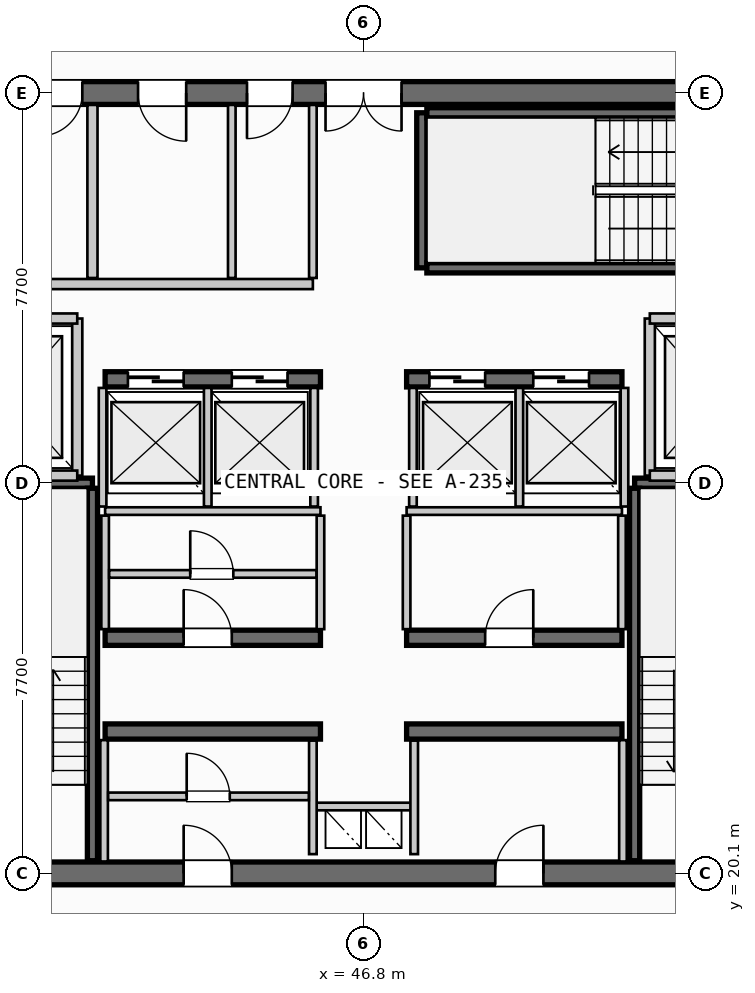
"""IFC4 building model, lengths in metres.
Left out: names, types, materials, properties, quantities, classifications, styles, units other than length and angle.
Written with IfcOpenShell. Run it as: python <this file> out.ifc"""

import sys

from ifc_helpers import new_model, si_unit, direction, frame, frame_2d, origin, place, context, subcontext, project, spatial, rectangle, extrude, source, transform, mapped, element, fill, save


model = new_model("IFC4")
c1 = context("Model", 3, precision=1e-05, world=origin(), true_north=direction((0.0, 1.0)))
c2 = subcontext(c1, "Body", "Model", "MODEL_VIEW")
j1 = project(units=[si_unit("LENGTHUNIT", "METRE"), si_unit("PLANEANGLEUNIT", "RADIAN")], contexts=[c1])
p1 = place(None, origin())
s1 = spatial("IfcSite", under=j1, at=p1, CompositionType="ELEMENT")
p2 = place(p1, origin())
s2 = spatial("IfcBuilding", under=s1, at=p2, CompositionType="ELEMENT")
p3 = place(p2, frame((0.0, 0.0, 256.0)))
s3 = spatial("IfcBuildingStorey", under=s2, at=p3, CompositionType="ELEMENT", Elevation=256.0)
p4 = place(p3, frame((38.0, 20.1, 0.0), z_axis=(0.0, 0.0, 1.0), x_axis=(1.0, 0.0, 0.0)))
e1 = element("IfcWall", 1, at=p4, inside=s3, PredefinedType="SHEAR", context=c2, shape_type="SweptSolid", body=[
    extrude(rectangle(XDim=17.6, YDim=0.45, at=frame_2d((8.8, 0.0))), origin(), (0.0, 0.0, 1.0), 3.21),
])
p5 = place(p4, frame((1.4, 0.0, 0.0)))
e2 = element("IfcOpeningElement", 2, at=p5, cuts=e1, PredefinedType="OPENING", context=c2, shape_type="SweptSolid", body=[
    extrude(rectangle(XDim=1.05, YDim=2.15, at=frame_2d((0.525, 1.075))), frame((0.0, 0.235, 0.0), z_axis=(0.0, -1.0, 0.0), x_axis=(1.0, 0.0, 0.0)), (0.0, 0.0, 1.0), 0.47),
])
p6 = place(p4, frame((15.15, 0.0, 0.0)))
e3 = element("IfcOpeningElement", 3, at=p6, cuts=e1, PredefinedType="OPENING", context=c2, shape_type="SweptSolid", body=[
    extrude(rectangle(XDim=1.05, YDim=2.15, at=frame_2d((0.525, 1.075))), frame((0.0, 0.235, 0.0), z_axis=(0.0, -1.0, 0.0), x_axis=(1.0, 0.0, 0.0)), (0.0, 0.0, 1.0), 0.47),
])
p7 = place(p4, frame((5.25, 0.0, 0.0)))
e4 = element("IfcOpeningElement", 4, at=p7, cuts=e1, PredefinedType="OPENING", context=c2, shape_type="SweptSolid", body=[
    extrude(rectangle(XDim=0.95, YDim=2.15, at=frame_2d((0.475, 1.075))), frame((0.0, 0.235, 0.0), z_axis=(0.0, -1.0, 0.0), x_axis=(1.0, 0.0, 0.0)), (0.0, 0.0, 1.0), 0.47),
])
p8 = place(p4, frame((11.4, 0.0, 0.0)))
e5 = element("IfcOpeningElement", 5, at=p8, cuts=e1, PredefinedType="OPENING", context=c2, shape_type="SweptSolid", body=[
    extrude(rectangle(XDim=0.95, YDim=2.15, at=frame_2d((0.475, 1.075))), frame((0.0, 0.235, 0.0), z_axis=(0.0, -1.0, 0.0), x_axis=(1.0, 0.0, 0.0)), (0.0, 0.0, 1.0), 0.47),
])
p9 = place(p3, frame((55.6, 35.5, 0.0), z_axis=(0.0, 0.0, 1.0), x_axis=(-1.0, 0.0, 0.0)))
e6 = element("IfcWall", 6, at=p9, inside=s3, PredefinedType="SHEAR", context=c2, shape_type="SweptSolid", body=[
    extrude(rectangle(XDim=17.6, YDim=0.45, at=frame_2d((8.8, 0.0))), origin(), (0.0, 0.0, 1.0), 3.21),
])
p10 = place(p9, frame((8.05, 0.0, 0.0)))
e7 = element("IfcOpeningElement", 7, at=p10, cuts=e6, PredefinedType="OPENING", context=c2, shape_type="SweptSolid", body=[
    extrude(rectangle(XDim=1.5, YDim=2.2, at=frame_2d((0.75, 1.1))), frame((0.0, 0.235, 0.0), z_axis=(0.0, -1.0, 0.0), x_axis=(1.0, 0.0, 0.0)), (0.0, 0.0, 1.0), 0.47),
])
p11 = place(p9, frame((15.85, 0.0, 0.0)))
e8 = element("IfcOpeningElement", 8, at=p11, cuts=e6, PredefinedType="OPENING", context=c2, shape_type="SweptSolid", body=[
    extrude(rectangle(XDim=0.85, YDim=2.15, at=frame_2d((0.425, 1.075))), frame((0.0, 0.235, 0.0), z_axis=(0.0, -1.0, 0.0), x_axis=(1.0, 0.0, 0.0)), (0.0, 0.0, 1.0), 0.47),
])
p12 = place(p9, frame((14.35, 0.0, 0.0)))
e9 = element("IfcOpeningElement", 9, at=p12, cuts=e6, PredefinedType="OPENING", context=c2, shape_type="SweptSolid", body=[
    extrude(rectangle(XDim=0.85, YDim=2.15, at=frame_2d((0.425, 1.075))), frame((0.0, 0.235, 0.0), z_axis=(0.0, -1.0, 0.0), x_axis=(1.0, 0.0, 0.0)), (0.0, 0.0, 1.0), 0.47),
])
p13 = place(p9, frame((12.3, 0.0, 0.0)))
e10 = element("IfcOpeningElement", 10, at=p13, cuts=e6, PredefinedType="OPENING", context=c2, shape_type="SweptSolid", body=[
    extrude(rectangle(XDim=0.95, YDim=2.15, at=frame_2d((0.475, 1.075))), frame((0.0, 0.235, 0.0), z_axis=(0.0, -1.0, 0.0), x_axis=(1.0, 0.0, 0.0)), (0.0, 0.0, 1.0), 0.47),
])
p14 = place(p9, frame((10.2, 0.0, 0.0)))
e11 = element("IfcOpeningElement", 11, at=p14, cuts=e6, PredefinedType="OPENING", context=c2, shape_type="SweptSolid", body=[
    extrude(rectangle(XDim=0.9, YDim=2.15, at=frame_2d((0.45, 1.075))), frame((0.0, 0.235, 0.0), z_axis=(0.0, -1.0, 0.0), x_axis=(1.0, 0.0, 0.0)), (0.0, 0.0, 1.0), 0.47),
])
for number, where, z_axis, x_axis in (
    (12, (41.7, 22.9, 0.0), (0.0, 0.0, 1.0), (1.0, 0.0, 0.0)),
    (13, (47.65, 22.9, 0.0), (0.0, 0.0, 1.0), (1.0, 0.0, 0.0)),
):
    element("IfcWall", number, at=place(p3, frame(where, z_axis=z_axis, x_axis=x_axis)), inside=s3, PredefinedType="SHEAR", context=c2, shape_type="SweptSolid", body=[
        extrude(rectangle(XDim=4.25, YDim=0.3, at=frame_2d((2.125, 0.0))), origin(), (0.0, 0.0, 1.0), 3.21),
    ])
p15 = place(p3, frame((41.7, 24.75, 0.0), z_axis=(0.0, 0.0, 1.0), x_axis=(1.0, 0.0, 0.0)))
e14 = element("IfcWall", 14, at=p15, inside=s3, PredefinedType="SHEAR", context=c2, shape_type="SweptSolid", body=[
    extrude(rectangle(XDim=4.25, YDim=0.3, at=frame_2d((2.125, 0.0))), origin(), (0.0, 0.0, 1.0), 3.21),
])
p16 = place(p15, frame((1.55, 0.0, 0.0)))
e15 = element("IfcOpeningElement", 15, at=p16, cuts=e14, PredefinedType="OPENING", context=c2, shape_type="SweptSolid", body=[
    extrude(rectangle(XDim=0.95, YDim=2.15, at=frame_2d((0.475, 1.075))), frame((0.0, 0.16, 0.0), z_axis=(0.0, -1.0, 0.0), x_axis=(1.0, 0.0, 0.0)), (0.0, 0.0, 1.0), 0.32),
])
p17 = place(p3, frame((47.65, 24.75, 0.0), z_axis=(0.0, 0.0, 1.0), x_axis=(1.0, 0.0, 0.0)))
e16 = element("IfcWall", 16, at=p17, inside=s3, PredefinedType="SHEAR", context=c2, shape_type="SweptSolid", body=[
    extrude(rectangle(XDim=4.25, YDim=0.3, at=frame_2d((2.125, 0.0))), origin(), (0.0, 0.0, 1.0), 3.21),
])
p18 = place(p17, frame((1.55, 0.0, 0.0)))
e17 = element("IfcOpeningElement", 17, at=p18, cuts=e16, PredefinedType="OPENING", context=c2, shape_type="SweptSolid", body=[
    extrude(rectangle(XDim=0.95, YDim=2.15, at=frame_2d((0.475, 1.075))), frame((0.0, 0.16, 0.0), z_axis=(0.0, -1.0, 0.0), x_axis=(1.0, 0.0, 0.0)), (0.0, 0.0, 1.0), 0.32),
])
p19 = place(p3, frame((41.7, 29.85, 0.0), z_axis=(0.0, 0.0, 1.0), x_axis=(1.0, 0.0, 0.0)))
e18 = element("IfcWall", 18, at=p19, inside=s3, PredefinedType="SHEAR", context=c2, shape_type="SweptSolid", body=[
    extrude(rectangle(XDim=4.25, YDim=0.3, at=frame_2d((2.125, 0.0))), origin(), (0.0, 0.0, 1.0), 3.21),
])
p20 = place(p19, frame((0.45, 0.0, 0.0)))
e19 = element("IfcOpeningElement", 19, at=p20, cuts=e18, PredefinedType="OPENING", context=c2, shape_type="SweptSolid", body=[
    extrude(rectangle(XDim=1.1, YDim=2.2, at=frame_2d((0.55, 1.1))), frame((0.0, 0.16, 0.0), z_axis=(0.0, -1.0, 0.0), x_axis=(1.0, 0.0, 0.0)), (0.0, 0.0, 1.0), 0.32),
])
p21 = place(p19, frame((2.5, 0.0, 0.0)))
e20 = element("IfcOpeningElement", 20, at=p21, cuts=e18, PredefinedType="OPENING", context=c2, shape_type="SweptSolid", body=[
    extrude(rectangle(XDim=1.1, YDim=2.2, at=frame_2d((0.55, 1.1))), frame((0.0, 0.16, 0.0), z_axis=(0.0, -1.0, 0.0), x_axis=(1.0, 0.0, 0.0)), (0.0, 0.0, 1.0), 0.32),
])
p22 = place(p3, frame((47.65, 29.85, 0.0), z_axis=(0.0, 0.0, 1.0), x_axis=(1.0, 0.0, 0.0)))
e21 = element("IfcWall", 21, at=p22, inside=s3, PredefinedType="SHEAR", context=c2, shape_type="SweptSolid", body=[
    extrude(rectangle(XDim=4.25, YDim=0.3, at=frame_2d((2.125, 0.0))), origin(), (0.0, 0.0, 1.0), 3.21),
])
p23 = place(p22, frame((0.45, 0.0, 0.0)))
e22 = element("IfcOpeningElement", 22, at=p23, cuts=e21, PredefinedType="OPENING", context=c2, shape_type="SweptSolid", body=[
    extrude(rectangle(XDim=1.1, YDim=2.2, at=frame_2d((0.55, 1.1))), frame((0.0, 0.16, 0.0), z_axis=(0.0, -1.0, 0.0), x_axis=(1.0, 0.0, 0.0)), (0.0, 0.0, 1.0), 0.32),
])
p24 = place(p22, frame((2.5, 0.0, 0.0)))
e23 = element("IfcOpeningElement", 23, at=p24, cuts=e21, PredefinedType="OPENING", context=c2, shape_type="SweptSolid", body=[
    extrude(rectangle(XDim=1.1, YDim=2.2, at=frame_2d((0.55, 1.1))), frame((0.0, 0.16, 0.0), z_axis=(0.0, -1.0, 0.0), x_axis=(1.0, 0.0, 0.0)), (0.0, 0.0, 1.0), 0.32),
])
p25 = place(p3, frame((38.39, 27.8, 0.0), z_axis=(0.0, 0.0, 1.0), x_axis=(1.0, 0.0, 0.0)))
e24 = element("IfcWall", 24, at=p25, inside=s3, PredefinedType="SHEAR", context=c2, shape_type="SweptSolid", body=[
    extrude(rectangle(XDim=3.06, YDim=0.2, at=frame_2d((1.53, 0.0))), origin(), (0.0, 0.0, 1.0), 3.21),
])
p26 = place(p3, frame((41.45, 27.7, 0.0), z_axis=(0.0, 0.0, 1.0), x_axis=(0.0, -1.0, 0.0)))
e25 = element("IfcWall", 25, at=p26, inside=s3, PredefinedType="SHEAR", context=c2, shape_type="SweptSolid", body=[
    extrude(rectangle(XDim=7.35, YDim=0.2, at=frame_2d((3.675, 0.0))), origin(), (0.0, 0.0, 1.0), 3.21),
])
p27 = place(p3, frame((52.15, 27.8, 0.0), z_axis=(0.0, 0.0, 1.0), x_axis=(1.0, 0.0, 0.0)))
e26 = element("IfcWall", 26, at=p27, inside=s3, PredefinedType="SHEAR", context=c2, shape_type="SweptSolid", body=[
    extrude(rectangle(XDim=3.06, YDim=0.2, at=frame_2d((1.53, 0.0))), origin(), (0.0, 0.0, 1.0), 3.21),
])
p28 = place(p3, frame((52.15, 20.35, 0.0), z_axis=(0.0, 0.0, 1.0), x_axis=(0.0, 1.0, 0.0)))
e27 = element("IfcWall", 27, at=p28, inside=s3, PredefinedType="SHEAR", context=c2, shape_type="SweptSolid", body=[
    extrude(rectangle(XDim=7.35, YDim=0.2, at=frame_2d((3.675, 0.0))), origin(), (0.0, 0.0, 1.0), 3.21),
])
p29 = place(p3, frame((47.95, 32.05, 0.0), z_axis=(0.0, 0.0, 1.0), x_axis=(0.0, 1.0, 0.0)))
e28 = element("IfcWall", 28, at=p29, inside=s3, PredefinedType="SHEAR", context=c2, shape_type="SweptSolid", body=[
    extrude(rectangle(XDim=3.06, YDim=0.2, at=frame_2d((1.53, 0.0))), origin(), (0.0, 0.0, 1.0), 3.21),
])
for number, where, z_axis, x_axis in (
    (29, (48.05, 35.11, 0.0), (0.0, 0.0, 1.0), (1.0, 0.0, 0.0)),
    (30, (55.4, 32.05, 0.0), (0.0, 0.0, 1.0), (-1.0, 0.0, 0.0)),
):
    element("IfcWall", number, at=place(p3, frame(where, z_axis=z_axis, x_axis=x_axis)), inside=s3, PredefinedType="SHEAR", context=c2, shape_type="SweptSolid", body=[
        extrude(rectangle(XDim=7.35, YDim=0.2, at=frame_2d((3.675, 0.0))), origin(), (0.0, 0.0, 1.0), 3.21),
    ])
p30 = place(p3, frame((45.8, 21.42, 0.0), z_axis=(0.0, 0.0, 1.0), x_axis=(1.0, 0.0, 0.0)))
e31 = element("IfcWall", 31, at=p30, inside=s3, PredefinedType="PARTITIONING", context=c2, shape_type="SweptSolid", body=[
    extrude(rectangle(XDim=2.0, YDim=0.15, at=frame_2d((1.0, 0.0))), origin(), (0.0, 0.0, 1.0), 2.28),
])
for number, where, z_axis, x_axis in (
    (32, (45.8, 20.48, 0.0), (0.0, 0.0, 1.0), (0.0, 1.0, 0.0)),
    (33, (47.8, 20.48, 0.0), (0.0, 0.0, 1.0), (0.0, 1.0, 0.0)),
):
    element("IfcWall", number, at=place(p3, frame(where, z_axis=z_axis, x_axis=x_axis)), inside=s3, PredefinedType="PARTITIONING", context=c2, shape_type="SweptSolid", body=[
        extrude(rectangle(XDim=2.24, YDim=0.15, at=frame_2d((1.12, 0.0))), origin(), (0.0, 0.0, 1.0), 2.28),
    ])
p31 = place(p3, frame((41.15, 27.95, 0.0), z_axis=(0.0, 0.0, 1.0), x_axis=(0.0, 1.0, 0.0)))
e34 = element("IfcWall", 34, at=p31, inside=s3, PredefinedType="PARTITIONING", context=c2, shape_type="SweptSolid", body=[
    extrude(rectangle(XDim=3.1, YDim=0.2, at=frame_2d((1.55, 0.0))), origin(), (0.0, 0.0, 1.0), 2.28),
])
for number, where, z_axis, x_axis in (
    (35, (38.235, 27.95, 0.0), (0.0, 0.0, 1.0), (1.0, 0.0, 0.0)),
    (36, (38.235, 31.05, 0.0), (0.0, 0.0, 1.0), (1.0, 0.0, 0.0)),
):
    element("IfcWall", number, at=place(p3, frame(where, z_axis=z_axis, x_axis=x_axis)), inside=s3, PredefinedType="PARTITIONING", context=c2, shape_type="SweptSolid", body=[
        extrude(rectangle(XDim=2.915, YDim=0.2, at=frame_2d((1.458, 0.0))), origin(), (0.0, 0.0, 1.0), 2.28),
    ])
p32 = place(p3, frame((52.45, 27.95, 0.0), z_axis=(0.0, 0.0, 1.0), x_axis=(0.0, 1.0, 0.0)))
e37 = element("IfcWall", 37, at=p32, inside=s3, PredefinedType="PARTITIONING", context=c2, shape_type="SweptSolid", body=[
    extrude(rectangle(XDim=3.1, YDim=0.2, at=frame_2d((1.55, 0.0))), origin(), (0.0, 0.0, 1.0), 2.28),
])
for number, where, z_axis, x_axis in (
    (38, (52.45, 27.95, 0.0), (0.0, 0.0, 1.0), (1.0, 0.0, 0.0)),
    (39, (52.45, 31.05, 0.0), (0.0, 0.0, 1.0), (1.0, 0.0, 0.0)),
):
    element("IfcWall", number, at=place(p3, frame(where, z_axis=z_axis, x_axis=x_axis)), inside=s3, PredefinedType="PARTITIONING", context=c2, shape_type="SweptSolid", body=[
        extrude(rectangle(XDim=2.915, YDim=0.2, at=frame_2d((1.458, 0.0))), origin(), (0.0, 0.0, 1.0), 2.28),
    ])
for number, where, z_axis, x_axis in (
    (40, (41.68, 20.335, 0.0), (0.0, 0.0, 1.0), (0.0, 1.0, 0.0)),
    (41, (51.92, 20.335, 0.0), (0.0, 0.0, 1.0), (0.0, 1.0, 0.0)),
):
    element("IfcWall", number, at=place(p3, frame(where, z_axis=z_axis, x_axis=x_axis)), inside=s3, PredefinedType="PARTITIONING", context=c2, shape_type="SweptSolid", body=[
        extrude(rectangle(XDim=2.395, YDim=0.15, at=frame_2d((1.198, 0.0))), origin(), (0.0, 0.0, 1.0), 2.28),
    ])
p33 = place(p3, frame((41.76, 21.62, 0.0), z_axis=(0.0, 0.0, 1.0), x_axis=(1.0, 0.0, 0.0)))
e42 = element("IfcWall", 42, at=p33, inside=s3, PredefinedType="PARTITIONING", context=c2, shape_type="SweptSolid", body=[
    extrude(rectangle(XDim=3.96, YDim=0.15, at=frame_2d((1.98, 0.0))), origin(), (0.0, 0.0, 1.0), 2.28),
])
p34 = place(p33, frame((1.55, 0.0, 0.0)))
e43 = element("IfcOpeningElement", 43, at=p34, cuts=e42, PredefinedType="OPENING", context=c2, shape_type="SweptSolid", body=[
    extrude(rectangle(XDim=0.85, YDim=2.15, at=frame_2d((0.425, 1.075))), frame((0.0, 0.085, 0.0), z_axis=(0.0, -1.0, 0.0), x_axis=(1.0, 0.0, 0.0)), (0.0, 0.0, 1.0), 0.17),
])
for number, where, z_axis, x_axis in (
    (44, (41.7, 27.25, 0.0), (0.0, 0.0, 1.0), (1.0, 0.0, 0.0)),
    (45, (47.65, 27.25, 0.0), (0.0, 0.0, 1.0), (1.0, 0.0, 0.0)),
):
    element("IfcWall", number, at=place(p3, frame(where, z_axis=z_axis, x_axis=x_axis)), inside=s3, PredefinedType="PARTITIONING", context=c2, shape_type="SweptSolid", body=[
        extrude(rectangle(XDim=4.25, YDim=0.15, at=frame_2d((2.125, 0.0))), origin(), (0.0, 0.0, 1.0), 2.28),
    ])
for number, where, z_axis, x_axis in (
    (46, (41.7, 24.92, 0.0), (0.0, 0.0, 1.0), (0.0, 1.0, 0.0)),
    (47, (45.95, 24.92, 0.0), (0.0, 0.0, 1.0), (0.0, 1.0, 0.0)),
    (48, (47.65, 24.92, 0.0), (0.0, 0.0, 1.0), (0.0, 1.0, 0.0)),
    (49, (51.9, 24.92, 0.0), (0.0, 0.0, 1.0), (0.0, 1.0, 0.0)),
):
    element("IfcWall", number, at=place(p3, frame(where, z_axis=z_axis, x_axis=x_axis)), inside=s3, PredefinedType="PARTITIONING", context=c2, shape_type="SweptSolid", body=[
        extrude(rectangle(XDim=2.24, YDim=0.15, at=frame_2d((1.12, 0.0))), origin(), (0.0, 0.0, 1.0), 2.28),
    ])
p35 = place(p3, frame((41.78, 26.01, 0.0), z_axis=(0.0, 0.0, 1.0), x_axis=(1.0, 0.0, 0.0)))
e50 = element("IfcWall", 50, at=p35, inside=s3, PredefinedType="PARTITIONING", context=c2, shape_type="SweptSolid", body=[
    extrude(rectangle(XDim=4.09, YDim=0.15, at=frame_2d((2.045, 0.0))), origin(), (0.0, 0.0, 1.0), 2.28),
])
p36 = place(p35, frame((1.6, 0.0, 0.0)))
e51 = element("IfcOpeningElement", 51, at=p36, cuts=e50, PredefinedType="OPENING", context=c2, shape_type="SweptSolid", body=[
    extrude(rectangle(XDim=0.85, YDim=2.15, at=frame_2d((0.425, 1.075))), frame((0.0, 0.085, 0.0), z_axis=(0.0, -1.0, 0.0), x_axis=(1.0, 0.0, 0.0)), (0.0, 0.0, 1.0), 0.17),
])
for number, where, z_axis, x_axis in (
    (52, (41.65, 27.34, 0.0), (0.0, 0.0, 1.0), (0.0, 1.0, 0.0)),
    (53, (43.725, 27.34, 0.0), (0.0, 0.0, 1.0), (0.0, 1.0, 0.0)),
    (54, (45.825, 27.34, 0.0), (0.0, 0.0, 1.0), (0.0, 1.0, 0.0)),
    (55, (47.775, 27.34, 0.0), (0.0, 0.0, 1.0), (0.0, 1.0, 0.0)),
    (56, (49.875, 27.34, 0.0), (0.0, 0.0, 1.0), (0.0, 1.0, 0.0)),
    (57, (51.95, 27.34, 0.0), (0.0, 0.0, 1.0), (0.0, 1.0, 0.0)),
):
    element("IfcWall", number, at=place(p3, frame(where, z_axis=z_axis, x_axis=x_axis)), inside=s3, PredefinedType="PARTITIONING", context=c2, shape_type="SweptSolid", body=[
        extrude(rectangle(XDim=2.34, YDim=0.15, at=frame_2d((1.17, 0.0))), origin(), (0.0, 0.0, 1.0), 2.28),
    ])
p37 = place(p3, frame((41.45, 31.85, 0.0), z_axis=(0.0, 0.0, 1.0), x_axis=(0.0, 1.0, 0.0)))
e58 = element("IfcWall", 58, at=p37, inside=s3, PredefinedType="PARTITIONING", context=c2, shape_type="SweptSolid", body=[
    extrude(rectangle(XDim=3.415, YDim=0.2, at=frame_2d((1.708, 0.0))), origin(), (0.0, 0.0, 1.0), 2.28),
])
p38 = place(p3, frame((38.235, 31.73, 0.0), z_axis=(0.0, 0.0, 1.0), x_axis=(1.0, 0.0, 0.0)))
e59 = element("IfcWall", 59, at=p38, inside=s3, PredefinedType="PARTITIONING", context=c2, shape_type="SweptSolid", body=[
    extrude(rectangle(XDim=7.565, YDim=0.2, at=frame_2d((3.782, 0.0))), origin(), (0.0, 0.0, 1.0), 2.28),
])
p39 = place(p3, frame((45.8, 31.85, 0.0), z_axis=(0.0, 0.0, 1.0), x_axis=(0.0, 1.0, 0.0)))
e60 = element("IfcWall", 60, at=p39, inside=s3, PredefinedType="PARTITIONING", context=c2, shape_type="SweptSolid", body=[
    extrude(rectangle(XDim=3.415, YDim=0.15, at=frame_2d((1.708, 0.0))), origin(), (0.0, 0.0, 1.0), 2.28),
])
p40 = place(p3, frame((44.2, 31.85, 0.0), z_axis=(0.0, 0.0, 1.0), x_axis=(0.0, 1.0, 0.0)))
e61 = element("IfcWall", 61, at=p40, inside=s3, PredefinedType="PLUMBINGWALL", context=c2, shape_type="SweptSolid", body=[
    extrude(rectangle(XDim=3.415, YDim=0.15, at=frame_2d((1.708, 0.0))), origin(), (0.0, 0.0, 1.0), 2.28),
])
m1 = source(origin(), c2, "Body", "SweptSolid", [
    extrude(rectangle(XDim=1.5, YDim=2.2, at=frame_2d((0.75, 1.1))), frame((0.0, 0.025, 0.0), z_axis=(0.0, -1.0, 0.0), x_axis=(1.0, 0.0, 0.0)), (0.0, 0.0, 1.0), 0.05),
])
p41 = place(p10, origin())
e62 = element("IfcDoor", 62, at=p41, inside=s3, OperationType="DOUBLE_DOOR_SINGLE_SWING", PredefinedType="DOOR", context=c2, shape_type="MappedRepresentation", body=[
    mapped(m1, transform((0.0, 0.0, 0.0), scale=1.0)),
])
fill(e7, e62)
m2 = source(origin(), c2, "Body", "SweptSolid", [
    extrude(rectangle(XDim=0.95, YDim=2.15, at=frame_2d((0.475, 1.075))), frame((0.0, 0.025, 0.0), z_axis=(0.0, -1.0, 0.0), x_axis=(1.0, 0.0, 0.0)), (0.0, 0.0, 1.0), 0.05),
])
p42 = place(p7, origin())
e63 = element("IfcDoor", 63, at=p42, inside=s3, OperationType="SINGLE_SWING_LEFT", PredefinedType="DOOR", context=c2, shape_type="MappedRepresentation", body=[
    mapped(m2, transform((0.0, 0.0, 0.0), scale=1.0)),
])
fill(e4, e63)
p43 = place(p8, origin())
e64 = element("IfcDoor", 64, at=p43, inside=s3, OperationType="SINGLE_SWING_RIGHT", PredefinedType="DOOR", context=c2, shape_type="MappedRepresentation", body=[
    mapped(m2, transform((0.0, 0.0, 0.0), scale=1.0)),
])
fill(e5, e64)
p44 = place(p16, origin())
e65 = element("IfcDoor", 65, at=p44, inside=s3, OperationType="SINGLE_SWING_LEFT", PredefinedType="DOOR", context=c2, shape_type="MappedRepresentation", body=[
    mapped(m2, transform((0.0, 0.0, 0.0), scale=1.0)),
])
fill(e15, e65)
p45 = place(p18, origin())
e66 = element("IfcDoor", 66, at=p45, inside=s3, OperationType="SINGLE_SWING_RIGHT", PredefinedType="DOOR", context=c2, shape_type="MappedRepresentation", body=[
    mapped(m2, transform((0.0, 0.0, 0.0), scale=1.0)),
])
fill(e17, e66)
m3 = source(origin(), c2, "Body", "SweptSolid", [
    extrude(rectangle(XDim=1.1, YDim=2.2, at=frame_2d((0.55, 1.1))), frame((0.0, 0.025, 0.0), z_axis=(0.0, -1.0, 0.0), x_axis=(1.0, 0.0, 0.0)), (0.0, 0.0, 1.0), 0.05),
])
p46 = place(p20, origin())
e67 = element("IfcDoor", 67, at=p46, inside=s3, OperationType="SLIDING_TO_LEFT", PredefinedType="DOOR", context=c2, shape_type="MappedRepresentation", body=[
    mapped(m3, transform((0.0, 0.0, 0.0), scale=1.0)),
])
fill(e19, e67)
p47 = place(p21, origin())
e68 = element("IfcDoor", 68, at=p47, inside=s3, OperationType="SLIDING_TO_LEFT", PredefinedType="DOOR", context=c2, shape_type="MappedRepresentation", body=[
    mapped(m3, transform((0.0, 0.0, 0.0), scale=1.0)),
])
fill(e20, e68)
p48 = place(p23, origin())
e69 = element("IfcDoor", 69, at=p48, inside=s3, OperationType="SLIDING_TO_LEFT", PredefinedType="DOOR", context=c2, shape_type="MappedRepresentation", body=[
    mapped(m3, transform((0.0, 0.0, 0.0), scale=1.0)),
])
fill(e22, e69)
p49 = place(p24, origin())
e70 = element("IfcDoor", 70, at=p49, inside=s3, OperationType="SLIDING_TO_LEFT", PredefinedType="DOOR", context=c2, shape_type="MappedRepresentation", body=[
    mapped(m3, transform((0.0, 0.0, 0.0), scale=1.0)),
])
fill(e23, e70)
m4 = source(origin(), c2, "Body", "SweptSolid", [
    extrude(rectangle(XDim=0.85, YDim=2.15, at=frame_2d((0.425, 1.075))), frame((0.0, 0.025, 0.0), z_axis=(0.0, -1.0, 0.0), x_axis=(1.0, 0.0, 0.0)), (0.0, 0.0, 1.0), 0.05),
])
p50 = place(p12, origin())
e71 = element("IfcDoor", 71, at=p50, inside=s3, OperationType="SINGLE_SWING_RIGHT", PredefinedType="DOOR", context=c2, shape_type="MappedRepresentation", body=[
    mapped(m4, transform((0.0, 0.0, 0.0), scale=1.0)),
])
fill(e9, e71)
p51 = place(p13, origin())
e72 = element("IfcDoor", 72, at=p51, inside=s3, OperationType="SINGLE_SWING_LEFT", PredefinedType="DOOR", context=c2, shape_type="MappedRepresentation", body=[
    mapped(m2, transform((0.0, 0.0, 0.0), scale=1.0)),
])
fill(e10, e72)
m5 = source(origin(), c2, "Body", "SweptSolid", [
    extrude(rectangle(XDim=0.9, YDim=2.15, at=frame_2d((0.45, 1.075))), frame((0.0, 0.025, 0.0), z_axis=(0.0, -1.0, 0.0), x_axis=(1.0, 0.0, 0.0)), (0.0, 0.0, 1.0), 0.05),
])
p52 = place(p14, origin())
e73 = element("IfcDoor", 73, at=p52, inside=s3, OperationType="SINGLE_SWING_RIGHT", PredefinedType="DOOR", context=c2, shape_type="MappedRepresentation", body=[
    mapped(m5, transform((0.0, 0.0, 0.0), scale=1.0)),
])
fill(e11, e73)
p53 = place(p34, origin())
e74 = element("IfcDoor", 74, at=p53, inside=s3, OperationType="SINGLE_SWING_LEFT", PredefinedType="DOOR", context=c2, shape_type="MappedRepresentation", body=[
    mapped(m4, transform((0.0, 0.0, 0.0), scale=1.0)),
])
fill(e43, e74)
p54 = place(p36, origin())
e75 = element("IfcDoor", 75, at=p54, inside=s3, OperationType="SINGLE_SWING_LEFT", PredefinedType="DOOR", context=c2, shape_type="MappedRepresentation", body=[
    mapped(m4, transform((0.0, 0.0, 0.0), scale=1.0)),
])
fill(e51, e75)
save(model, sys.argv[1])
